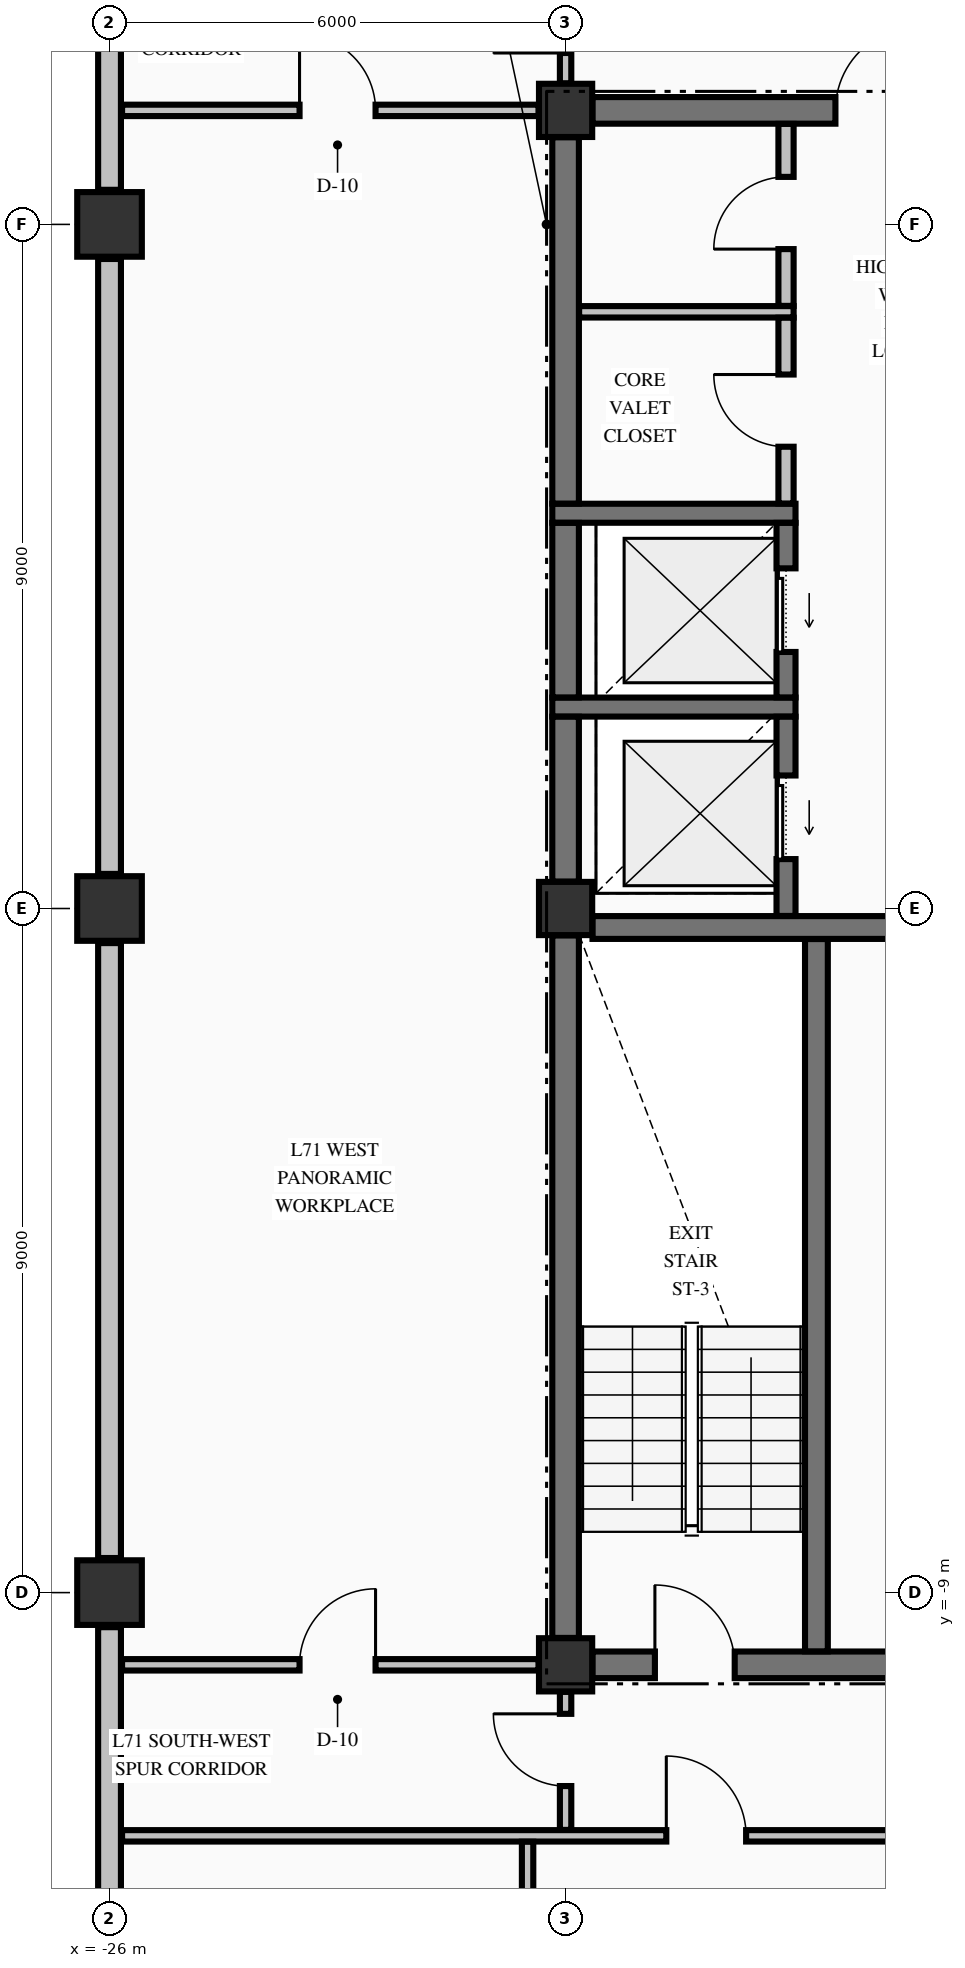
"""IFC4 building model, lengths in metres.
Left out: names, types, materials, properties, quantities, classifications, styles, units other than length and angle.
Written with IfcOpenShell. Run it as: python <this file> out.ifc"""

import sys

from ifc_helpers import new_model, si_unit, direction, frame, frame_2d, origin, origin_2d, place, context, subcontext, project, spatial, rectangle, extrude, element, fill, save


model = new_model("IFC4")
c1 = context("Model", 3, precision=1e-05, world=origin(), true_north=direction((0.0, 1.0)))
c2 = subcontext(c1, "Body", "Model", "MODEL_VIEW")
j1 = project(units=[si_unit("LENGTHUNIT", "METRE"), si_unit("PLANEANGLEUNIT", "RADIAN")], contexts=[c1])
p1 = place(None, origin())
s1 = spatial("IfcSite", under=j1, at=p1, CompositionType="ELEMENT")
p2 = place(p1, origin())
s2 = spatial("IfcBuilding", under=s1, at=p2, CompositionType="ELEMENT")
p3 = place(p2, frame((0.0, 0.0, 267.35)))
s3 = spatial("IfcBuildingStorey", under=s2, at=p3, CompositionType="ELEMENT", Elevation=267.35)
for number, where, z_axis, x_axis in (
    (1, (-26.0, -9.0, -0.25), (0.0, 0.0, 1.0), (1.0, 0.0, 0.0)),
    (2, (-26.0, 0.0, -0.25), (0.0, 0.0, 1.0), (1.0, 0.0, 0.0)),
    (3, (-26.0, 9.0, -0.25), (0.0, 0.0, 1.0), (1.0, 0.0, 0.0)),
):
    element("IfcColumn", number, at=place(p3, frame(where, z_axis=z_axis, x_axis=x_axis)), inside=s3, PredefinedType="COLUMN", context=c2, shape_type="SweptSolid", body=[
        extrude(rectangle(XDim=0.85, YDim=0.85, at=origin_2d()), origin(), (0.0, 0.0, 1.0), 3.155),
    ])
for number, where, z_axis, x_axis in (
    (4, (-20.0, -9.95, -0.25), (0.0, 0.0, 1.0), (1.0, 0.0, 0.0)),
    (5, (-20.0, 10.5, -0.25), (0.0, 0.0, 1.0), (1.0, 0.0, 0.0)),
    (6, (-20.0, 0.0, -0.25), (0.0, 0.0, 1.0), (1.0, 0.0, 0.0)),
):
    element("IfcColumn", number, at=place(p3, frame(where, z_axis=z_axis, x_axis=x_axis)), inside=s3, PredefinedType="COLUMN", context=c2, shape_type="SweptSolid", body=[
        extrude(rectangle(XDim=0.7, YDim=0.7, at=origin_2d()), origin(), (0.0, 0.0, 1.0), 3.155),
    ])
for number, where, z_axis, x_axis in (
    (7, (-26.0, -9.455, 0.0), (0.0, 0.0, 1.0), (0.0, -1.0, 0.0)),
    (8, (-26.0, -0.455, 0.0), (0.0, 0.0, 1.0), (0.0, -1.0, 0.0)),
    (9, (-26.0, 8.545, 0.0), (0.0, 0.0, 1.0), (0.0, -1.0, 0.0)),
    (10, (-26.0, 17.545, 0.0), (0.0, 0.0, 1.0), (0.0, -1.0, 0.0)),
):
    element("IfcWall", number, at=place(p3, frame(where, z_axis=z_axis, x_axis=x_axis)), inside=s3, PredefinedType="STANDARD", context=c2, shape_type="SweptSolid", body=[
        extrude(rectangle(XDim=8.09, YDim=0.3, at=frame_2d((4.045, 0.0))), origin(), (0.0, 0.0, 1.0), 2.297),
    ])
p4 = place(p3, frame((-19.646, -9.95, 0.0), z_axis=(0.0, 0.0, 1.0), x_axis=(1.0, 0.0, 0.0)))
e11 = element("IfcWall", 11, at=p4, inside=s3, PredefinedType="SHEAR", context=c2, shape_type="SweptSolid", body=[
    extrude(rectangle(XDim=4.946, YDim=0.35, at=frame_2d((2.473, 0.0))), origin(), (0.0, 0.0, 1.0), 2.905),
])
p5 = place(p4, frame((0.821, 0.0, 0.0)))
e12 = element("IfcOpeningElement", 12, at=p5, cuts=e11, PredefinedType="OPENING", context=c2, shape_type="SweptSolid", body=[
    extrude(rectangle(XDim=1.05, YDim=2.15, at=frame_2d((0.525, 1.075))), frame((0.0, 0.185, 0.0), z_axis=(0.0, -1.0, 0.0), x_axis=(1.0, 0.0, 0.0)), (0.0, 0.0, 1.0), 0.37),
])
p6 = place(p3, frame((-19.646, -0.25, 0.0), z_axis=(0.0, 0.0, 1.0), x_axis=(1.0, 0.0, 0.0)))
e13 = element("IfcWall", 13, at=p6, inside=s3, PredefinedType="SHEAR", context=c2, shape_type="SweptSolid", body=[
    extrude(rectangle(XDim=8.292, YDim=0.3, at=frame_2d((4.146, 0.0))), origin(), (0.0, 0.0, 1.0), 2.905),
])
p7 = place(p6, frame((5.946, 0.0, 0.0)))
e14 = element("IfcOpeningElement", 14, at=p7, cuts=e13, PredefinedType="OPENING", context=c2, shape_type="SweptSolid", body=[
    extrude(rectangle(XDim=1.1, YDim=2.15, at=frame_2d((0.55, 1.075))), frame((0.0, 0.16, 0.0), z_axis=(0.0, -1.0, 0.0), x_axis=(1.0, 0.0, 0.0)), (0.0, 0.0, 1.0), 0.32),
])
for number, where, z_axis, x_axis in (
    (15, (-20.175, 2.65, 0.0), (0.0, 0.0, 1.0), (1.0, 0.0, 0.0)),
    (16, (-20.175, 5.2, 0.0), (0.0, 0.0, 1.0), (1.0, 0.0, 0.0)),
):
    element("IfcWall", number, at=place(p3, frame(where, z_axis=z_axis, x_axis=x_axis)), inside=s3, PredefinedType="SOLIDWALL", context=c2, shape_type="SweptSolid", body=[
        extrude(rectangle(XDim=3.2, YDim=0.25, at=frame_2d((1.6, 0.0))), origin(), (0.0, 0.0, 1.0), 2.905),
    ])
p8 = place(p3, frame((-19.646, 10.5, 0.0), z_axis=(0.0, 0.0, 1.0), x_axis=(1.0, 0.0, 0.0)))
e17 = element("IfcWall", 17, at=p8, inside=s3, PredefinedType="SHEAR", context=c2, shape_type="SweptSolid", body=[
    extrude(rectangle(XDim=4.946, YDim=0.35, at=frame_2d((2.473, 0.0))), origin(), (0.0, 0.0, 1.0), 2.905),
])
p9 = place(p8, frame((3.196, 0.0, 0.0)))
e18 = element("IfcOpeningElement", 18, at=p9, cuts=e17, PredefinedType="OPENING", context=c2, shape_type="SweptSolid", body=[
    extrude(rectangle(XDim=1.1, YDim=2.15, at=frame_2d((0.55, 1.075))), frame((0.0, 0.185, 0.0), z_axis=(0.0, -1.0, 0.0), x_axis=(1.0, 0.0, 0.0)), (0.0, 0.0, 1.0), 0.37),
])
p10 = place(p3, frame((-25.835, -12.2, 0.0), z_axis=(0.0, 0.0, 1.0), x_axis=(1.0, 0.0, 0.0)))
e19 = element("IfcWall", 19, at=p10, inside=s3, PredefinedType="PARTITIONING", context=c2, shape_type="SweptSolid", body=[
    extrude(rectangle(XDim=45.91, YDim=0.15, at=frame_2d((22.955, 0.0))), origin(), (0.0, 0.0, 1.0), 2.905),
])
p11 = place(p10, frame((7.16, 0.0, 0.0)))
e20 = element("IfcOpeningElement", 20, at=p11, cuts=e19, PredefinedType="OPENING", context=c2, shape_type="SweptSolid", body=[
    extrude(rectangle(XDim=1.05, YDim=2.15, at=frame_2d((0.525, 1.075))), frame((0.0, 0.085, 0.0), z_axis=(0.0, -1.0, 0.0), x_axis=(1.0, 0.0, 0.0)), (0.0, 0.0, 1.0), 0.17),
])
p12 = place(p10, frame((33.06, 0.0, 0.0)))
e21 = element("IfcOpeningElement", 21, at=p12, cuts=e19, PredefinedType="OPENING", context=c2, shape_type="SweptSolid", body=[
    extrude(rectangle(XDim=1.05, YDim=2.15, at=frame_2d((0.525, 1.075))), frame((0.0, 0.085, 0.0), z_axis=(0.0, -1.0, 0.0), x_axis=(1.0, 0.0, 0.0)), (0.0, 0.0, 1.0), 0.17),
])
p13 = place(p3, frame((-25.835, -9.95, 0.0), z_axis=(0.0, 0.0, 1.0), x_axis=(1.0, 0.0, 0.0)))
e22 = element("IfcWall", 22, at=p13, inside=s3, PredefinedType="PARTITIONING", context=c2, shape_type="SweptSolid", body=[
    extrude(rectangle(XDim=5.479, YDim=0.15, at=frame_2d((2.74, 0.0))), origin(), (0.0, 0.0, 1.0), 2.905),
])
p14 = place(p13, frame((2.335, 0.0, 0.0)))
e23 = element("IfcOpeningElement", 23, at=p14, cuts=e22, PredefinedType="OPENING", context=c2, shape_type="SweptSolid", body=[
    extrude(rectangle(XDim=1.0, YDim=2.15, at=frame_2d((0.5, 1.075))), frame((0.0, 0.085, 0.0), z_axis=(0.0, -1.0, 0.0), x_axis=(1.0, 0.0, 0.0)), (0.0, 0.0, 1.0), 0.17),
])
p15 = place(p3, frame((-19.822, 7.85, 0.0), z_axis=(0.0, 0.0, 1.0), x_axis=(1.0, 0.0, 0.0)))
e24 = element("IfcWall", 24, at=p15, inside=s3, PredefinedType="PARTITIONING", context=c2, shape_type="SweptSolid", body=[
    extrude(rectangle(XDim=2.822, YDim=0.15, at=frame_2d((1.411, 0.0))), origin(), (0.0, 0.0, 1.0), 2.905),
])
p16 = place(p3, frame((-25.835, 10.5, 0.0), z_axis=(0.0, 0.0, 1.0), x_axis=(1.0, 0.0, 0.0)))
e25 = element("IfcWall", 25, at=p16, inside=s3, PredefinedType="PARTITIONING", context=c2, shape_type="SweptSolid", body=[
    extrude(rectangle(XDim=5.479, YDim=0.15, at=frame_2d((2.74, 0.0))), origin(), (0.0, 0.0, 1.0), 2.905),
])
p17 = place(p16, frame((2.335, 0.0, 0.0)))
e26 = element("IfcOpeningElement", 26, at=p17, cuts=e25, PredefinedType="OPENING", context=c2, shape_type="SweptSolid", body=[
    extrude(rectangle(XDim=1.0, YDim=2.15, at=frame_2d((0.5, 1.075))), frame((0.0, 0.085, 0.0), z_axis=(0.0, -1.0, 0.0), x_axis=(1.0, 0.0, 0.0)), (0.0, 0.0, 1.0), 0.17),
])
p18 = place(p3, frame((-20.0, -9.596, 0.0), z_axis=(0.0, 0.0, 1.0), x_axis=(0.0, 1.0, 0.0)))
e27 = element("IfcWall", 27, at=p18, inside=s3, PredefinedType="SHEAR", context=c2, shape_type="SweptSolid", body=[
    extrude(rectangle(XDim=9.242, YDim=0.35, at=frame_2d((4.621, 0.0))), origin(), (0.0, 0.0, 1.0), 2.905),
])
p19 = place(p3, frame((-20.0, 0.354, 0.0), z_axis=(0.0, 0.0, 1.0), x_axis=(0.0, 1.0, 0.0)))
e28 = element("IfcWall", 28, at=p19, inside=s3, PredefinedType="SHEAR", context=c2, shape_type="SweptSolid", body=[
    extrude(rectangle(XDim=2.169, YDim=0.35, at=frame_2d((1.084, 0.0))), origin(), (0.0, 0.0, 1.0), 2.905),
])
p20 = place(p3, frame((-20.0, 2.777, 0.0), z_axis=(0.0, 0.0, 1.0), x_axis=(0.0, 1.0, 0.0)))
e29 = element("IfcWall", 29, at=p20, inside=s3, PredefinedType="SHEAR", context=c2, shape_type="SweptSolid", body=[
    extrude(rectangle(XDim=2.296, YDim=0.35, at=frame_2d((1.148, 0.0))), origin(), (0.0, 0.0, 1.0), 2.905),
])
p21 = place(p3, frame((-20.0, 5.327, 0.0), z_axis=(0.0, 0.0, 1.0), x_axis=(0.0, 1.0, 0.0)))
e30 = element("IfcWall", 30, at=p21, inside=s3, PredefinedType="SHEAR", context=c2, shape_type="SweptSolid", body=[
    extrude(rectangle(XDim=4.819, YDim=0.35, at=frame_2d((2.41, 0.0))), origin(), (0.0, 0.0, 1.0), 2.905),
])
p22 = place(p3, frame((-17.1, -0.098, 0.0), z_axis=(0.0, 0.0, 1.0), x_axis=(0.0, 1.0, 0.0)))
e31 = element("IfcWall", 31, at=p22, inside=s3, PredefinedType="SOLIDWALL", context=c2, shape_type="SweptSolid", body=[
    extrude(rectangle(XDim=2.621, YDim=0.25, at=frame_2d((1.311, 0.0))), origin(), (0.0, 0.0, 1.0), 2.905),
])
p23 = place(p22, frame((0.748, 0.0, 0.0)))
e32 = element("IfcOpeningElement", 32, at=p23, cuts=e31, PredefinedType="OPENING", context=c2, shape_type="SweptSolid", body=[
    extrude(rectangle(XDim=1.1, YDim=2.2, at=frame_2d((0.55, 1.1))), frame((0.0, 0.135, 0.0), z_axis=(0.0, -1.0, 0.0), x_axis=(1.0, 0.0, 0.0)), (0.0, 0.0, 1.0), 0.27),
])
p24 = place(p3, frame((-17.1, 2.777, 0.0), z_axis=(0.0, 0.0, 1.0), x_axis=(0.0, 1.0, 0.0)))
e33 = element("IfcWall", 33, at=p24, inside=s3, PredefinedType="SOLIDWALL", context=c2, shape_type="SweptSolid", body=[
    extrude(rectangle(XDim=2.296, YDim=0.25, at=frame_2d((1.148, 0.0))), origin(), (0.0, 0.0, 1.0), 2.905),
])
p25 = place(p24, frame((0.598, 0.0, 0.0)))
e34 = element("IfcOpeningElement", 34, at=p25, cuts=e33, PredefinedType="OPENING", context=c2, shape_type="SweptSolid", body=[
    extrude(rectangle(XDim=1.1, YDim=2.2, at=frame_2d((0.55, 1.1))), frame((0.0, 0.135, 0.0), z_axis=(0.0, -1.0, 0.0), x_axis=(1.0, 0.0, 0.0)), (0.0, 0.0, 1.0), 0.27),
])
p26 = place(p3, frame((-16.7, -9.773, 0.0), z_axis=(0.0, 0.0, 1.0), x_axis=(0.0, 1.0, 0.0)))
e35 = element("IfcWall", 35, at=p26, inside=s3, PredefinedType="SHEAR", context=c2, shape_type="SweptSolid", body=[
    extrude(rectangle(XDim=9.371, YDim=0.3, at=frame_2d((4.686, 0.0))), origin(), (0.0, 0.0, 1.0), 2.905),
])
p27 = place(p3, frame((-20.5, -17.569, 0.0), z_axis=(0.0, 0.0, 1.0), x_axis=(0.0, 1.0, 0.0)))
e36 = element("IfcWall", 36, at=p27, inside=s3, PredefinedType="PARTITIONING", context=c2, shape_type="SweptSolid", body=[
    extrude(rectangle(XDim=5.291, YDim=0.15, at=frame_2d((2.646, 0.0))), origin(), (0.0, 0.0, 1.0), 2.905),
])
p28 = place(p3, frame((-20.0, -12.122, 0.0), z_axis=(0.0, 0.0, 1.0), x_axis=(0.0, 1.0, 0.0)))
e37 = element("IfcWall", 37, at=p28, inside=s3, PredefinedType="PARTITIONING", context=c2, shape_type="SweptSolid", body=[
    extrude(rectangle(XDim=1.816, YDim=0.15, at=frame_2d((0.908, 0.0))), origin(), (0.0, 0.0, 1.0), 2.905),
])
p29 = place(p28, frame((0.577, 0.0, 0.0)))
e38 = element("IfcOpeningElement", 38, at=p29, cuts=e37, PredefinedType="OPENING", context=c2, shape_type="SweptSolid", body=[
    extrude(rectangle(XDim=0.95, YDim=2.15, at=frame_2d((0.475, 1.075))), frame((0.0, 0.085, 0.0), z_axis=(0.0, -1.0, 0.0), x_axis=(1.0, 0.0, 0.0)), (0.0, 0.0, 1.0), 0.17),
])
p30 = place(p3, frame((-20.0, 10.856, 0.0), z_axis=(0.0, 0.0, 1.0), x_axis=(0.0, 1.0, 0.0)))
e39 = element("IfcWall", 39, at=p30, inside=s3, PredefinedType="PARTITIONING", context=c2, shape_type="SweptSolid", body=[
    extrude(rectangle(XDim=2.016, YDim=0.15, at=frame_2d((1.008, 0.0))), origin(), (0.0, 0.0, 1.0), 2.905),
])
p31 = place(p30, frame((0.399, 0.0, 0.0)))
e40 = element("IfcOpeningElement", 40, at=p31, cuts=e39, PredefinedType="OPENING", context=c2, shape_type="SweptSolid", body=[
    extrude(rectangle(XDim=0.95, YDim=2.15, at=frame_2d((0.475, 1.075))), frame((0.0, 0.085, 0.0), z_axis=(0.0, -1.0, 0.0), x_axis=(1.0, 0.0, 0.0)), (0.0, 0.0, 1.0), 0.17),
])
p32 = place(p3, frame((-17.1, 5.328, 0.0), z_axis=(0.0, 0.0, 1.0), x_axis=(0.0, 1.0, 0.0)))
e41 = element("IfcWall", 41, at=p32, inside=s3, PredefinedType="PARTITIONING", context=c2, shape_type="SweptSolid", body=[
    extrude(rectangle(XDim=2.444, YDim=0.2, at=frame_2d((1.222, 0.0))), origin(), (0.0, 0.0, 1.0), 2.905),
])
p33 = place(p32, frame((0.747, 0.0, 0.0)))
e42 = element("IfcOpeningElement", 42, at=p33, cuts=e41, PredefinedType="OPENING", context=c2, shape_type="SweptSolid", body=[
    extrude(rectangle(XDim=0.95, YDim=2.15, at=frame_2d((0.475, 1.075))), frame((0.0, 0.11, 0.0), z_axis=(0.0, -1.0, 0.0), x_axis=(1.0, 0.0, 0.0)), (0.0, 0.0, 1.0), 0.22),
])
p34 = place(p3, frame((-17.1, 7.928, 0.0), z_axis=(0.0, 0.0, 1.0), x_axis=(0.0, 1.0, 0.0)))
e43 = element("IfcWall", 43, at=p34, inside=s3, PredefinedType="PARTITIONING", context=c2, shape_type="SweptSolid", body=[
    extrude(rectangle(XDim=2.394, YDim=0.2, at=frame_2d((1.197, 0.0))), origin(), (0.0, 0.0, 1.0), 2.905),
])
p35 = place(p34, frame((0.747, 0.0, 0.0)))
e44 = element("IfcOpeningElement", 44, at=p35, cuts=e43, PredefinedType="OPENING", context=c2, shape_type="SweptSolid", body=[
    extrude(rectangle(XDim=0.95, YDim=2.15, at=frame_2d((0.475, 1.075))), frame((0.0, 0.11, 0.0), z_axis=(0.0, -1.0, 0.0), x_axis=(1.0, 0.0, 0.0)), (0.0, 0.0, 1.0), 0.22),
])
p36 = place(p5, origin())
e45 = element("IfcDoor", 45, at=p36, inside=s3, OperationType="SINGLE_SWING_LEFT", PredefinedType="DOOR", context=c2, shape_type="SweptSolid", body=[
    extrude(rectangle(XDim=1.05, YDim=2.15, at=frame_2d((0.525, 1.075))), frame((0.0, 0.025, 0.0), z_axis=(0.0, -1.0, 0.0), x_axis=(1.0, 0.0, 0.0)), (0.0, 0.0, 1.0), 0.05),
])
fill(e12, e45)
p37 = place(p23, origin())
e46 = element("IfcDoor", 46, at=p37, inside=s3, OperationType="SLIDING_TO_LEFT", PredefinedType="DOOR", context=c2, shape_type="SweptSolid", body=[
    extrude(rectangle(XDim=1.1, YDim=2.2, at=frame_2d((0.55, 1.1))), frame((0.0, 0.025, 0.0), z_axis=(0.0, -1.0, 0.0), x_axis=(1.0, 0.0, 0.0)), (0.0, 0.0, 1.0), 0.05),
])
fill(e32, e46)
p38 = place(p25, origin())
e47 = element("IfcDoor", 47, at=p38, inside=s3, OperationType="SLIDING_TO_LEFT", PredefinedType="DOOR", context=c2, shape_type="SweptSolid", body=[
    extrude(rectangle(XDim=1.1, YDim=2.2, at=frame_2d((0.55, 1.1))), frame((0.0, 0.025, 0.0), z_axis=(0.0, -1.0, 0.0), x_axis=(1.0, 0.0, 0.0)), (0.0, 0.0, 1.0), 0.05),
])
fill(e34, e47)
p39 = place(p9, origin())
e48 = element("IfcDoor", 48, at=p39, inside=s3, OperationType="SINGLE_SWING_RIGHT", PredefinedType="DOOR", context=c2, shape_type="SweptSolid", body=[
    extrude(rectangle(XDim=1.1, YDim=2.15, at=frame_2d((0.55, 1.075))), frame((0.0, 0.025, 0.0), z_axis=(0.0, -1.0, 0.0), x_axis=(1.0, 0.0, 0.0)), (0.0, 0.0, 1.0), 0.05),
])
fill(e18, e48)
p40 = place(p35, origin())
e49 = element("IfcDoor", 49, at=p40, inside=s3, OperationType="SINGLE_SWING_LEFT", PredefinedType="DOOR", context=c2, shape_type="SweptSolid", body=[
    extrude(rectangle(XDim=0.95, YDim=2.15, at=frame_2d((0.475, 1.075))), frame((0.0, 0.025, 0.0), z_axis=(0.0, -1.0, 0.0), x_axis=(1.0, 0.0, 0.0)), (0.0, 0.0, 1.0), 0.05),
])
fill(e44, e49)
p41 = place(p33, origin())
e50 = element("IfcDoor", 50, at=p41, inside=s3, OperationType="SINGLE_SWING_RIGHT", PredefinedType="DOOR", context=c2, shape_type="SweptSolid", body=[
    extrude(rectangle(XDim=0.95, YDim=2.15, at=frame_2d((0.475, 1.075))), frame((0.0, 0.025, 0.0), z_axis=(0.0, -1.0, 0.0), x_axis=(1.0, 0.0, 0.0)), (0.0, 0.0, 1.0), 0.05),
])
fill(e42, e50)
p42 = place(p11, origin())
e51 = element("IfcDoor", 51, at=p42, inside=s3, OperationType="SINGLE_SWING_LEFT", PredefinedType="DOOR", context=c2, shape_type="SweptSolid", body=[
    extrude(rectangle(XDim=1.05, YDim=2.15, at=frame_2d((0.525, 1.075))), frame((0.0, 0.025, 0.0), z_axis=(0.0, -1.0, 0.0), x_axis=(1.0, 0.0, 0.0)), (0.0, 0.0, 1.0), 0.05),
])
fill(e20, e51)
p43 = place(p31, origin())
e52 = element("IfcDoor", 52, at=p43, inside=s3, OperationType="SINGLE_SWING_LEFT", PredefinedType="DOOR", context=c2, shape_type="SweptSolid", body=[
    extrude(rectangle(XDim=0.95, YDim=2.15, at=frame_2d((0.475, 1.075))), frame((0.0, 0.025, 0.0), z_axis=(0.0, -1.0, 0.0), x_axis=(1.0, 0.0, 0.0)), (0.0, 0.0, 1.0), 0.05),
])
fill(e40, e52)
p44 = place(p29, origin())
e53 = element("IfcDoor", 53, at=p44, inside=s3, OperationType="SINGLE_SWING_RIGHT", PredefinedType="DOOR", context=c2, shape_type="SweptSolid", body=[
    extrude(rectangle(XDim=0.95, YDim=2.15, at=frame_2d((0.475, 1.075))), frame((0.0, 0.025, 0.0), z_axis=(0.0, -1.0, 0.0), x_axis=(1.0, 0.0, 0.0)), (0.0, 0.0, 1.0), 0.05),
])
fill(e38, e53)
p45 = place(p17, origin())
e54 = element("IfcDoor", 54, at=p45, inside=s3, OperationType="SINGLE_SWING_LEFT", PredefinedType="DOOR", context=c2, shape_type="SweptSolid", body=[
    extrude(rectangle(XDim=1.0, YDim=2.15, at=frame_2d((0.5, 1.075))), frame((0.0, 0.025, 0.0), z_axis=(0.0, -1.0, 0.0), x_axis=(1.0, 0.0, 0.0)), (0.0, 0.0, 1.0), 0.05),
])
fill(e26, e54)
p46 = place(p14, origin())
e55 = element("IfcDoor", 55, at=p46, inside=s3, OperationType="SINGLE_SWING_RIGHT", PredefinedType="DOOR", context=c2, shape_type="SweptSolid", body=[
    extrude(rectangle(XDim=1.0, YDim=2.15, at=frame_2d((0.5, 1.075))), frame((0.0, 0.025, 0.0), z_axis=(0.0, -1.0, 0.0), x_axis=(1.0, 0.0, 0.0)), (0.0, 0.0, 1.0), 0.05),
])
fill(e23, e55)
save(model, sys.argv[1])
